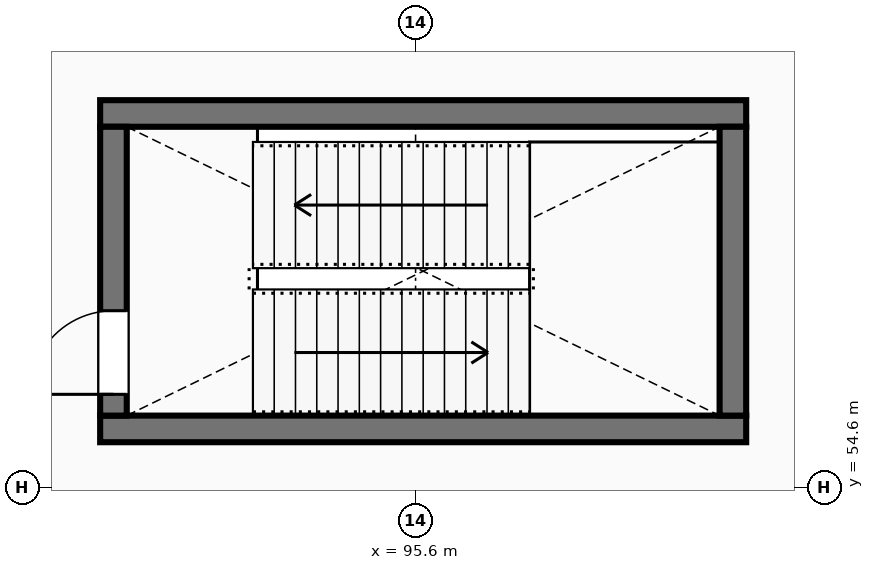
"""IFC4 building model, lengths in metres.
Left out: names, types, materials, properties, quantities, classifications, styles, units other than length and angle.
Written with IfcOpenShell. Run it as: python <this file> out.ifc"""

import sys

from ifc_helpers import new_model, si_unit, direction, frame, frame_2d, origin, place, context, subcontext, project, spatial, rectangle, extrude, element, fill, save


model = new_model("IFC4")
c1 = context("Model", 3, precision=1e-05, world=origin(), true_north=direction((0.0, 1.0)))
c2 = subcontext(c1, "Body", "Model", "MODEL_VIEW")
j1 = project(units=[si_unit("LENGTHUNIT", "METRE"), si_unit("PLANEANGLEUNIT", "RADIAN")], contexts=[c1])
p1 = place(None, origin())
s1 = spatial("IfcSite", under=j1, at=p1, CompositionType="ELEMENT")
p2 = place(p1, origin())
s2 = spatial("IfcBuilding", under=s1, at=p2, CompositionType="ELEMENT")
p3 = place(p2, frame((0.0, 0.0, 10.2)))
s3 = spatial("IfcBuildingStorey", under=s2, at=p3, CompositionType="ELEMENT", Elevation=10.2)
for number, where, z_axis, x_axis in (
    (1, (91.45, 55.375, 0.0), (0.0, 0.0, 1.0), (1.0, 0.0, 0.0)),
    (2, (99.95, 59.525, 0.0), (0.0, 0.0, 1.0), (-1.0, 0.0, 0.0)),
):
    element("IfcWall", number, at=place(p3, frame(where, z_axis=z_axis, x_axis=x_axis)), inside=s3, PredefinedType="SHEAR", context=c2, shape_type="SweptSolid", body=[
        extrude(rectangle(XDim=8.5, YDim=0.35, at=frame_2d((4.25, 0.0))), origin(), (0.0, 0.0, 1.0), 4.48),
    ])
p4 = place(p3, frame((91.625, 55.55, 0.0), z_axis=(0.0, 0.0, 1.0), x_axis=(0.0, 1.0, 0.0)))
e3 = element("IfcWall", 3, at=p4, inside=s3, PredefinedType="SHEAR", context=c2, shape_type="SweptSolid", body=[
    extrude(rectangle(XDim=3.8, YDim=0.35, at=frame_2d((1.9, 0.0))), origin(), (0.0, 0.0, 1.0), 4.48),
])
p5 = place(p4, frame((0.28, 0.0, 0.0)))
e4 = element("IfcOpeningElement", 4, at=p5, cuts=e3, PredefinedType="OPENING", context=c2, shape_type="SweptSolid", body=[
    extrude(rectangle(XDim=1.1, YDim=2.08, at=frame_2d((0.55, 1.04))), frame((0.0, 0.185, 0.0), z_axis=(0.0, -1.0, 0.0), x_axis=(1.0, 0.0, 0.0)), (0.0, 0.0, 1.0), 0.37),
])
p6 = place(p3, frame((99.775, 59.35, 0.0), z_axis=(0.0, 0.0, 1.0), x_axis=(0.0, -1.0, 0.0)))
e5 = element("IfcWall", 5, at=p6, inside=s3, PredefinedType="SHEAR", context=c2, shape_type="SweptSolid", body=[
    extrude(rectangle(XDim=3.8, YDim=0.35, at=frame_2d((1.9, 0.0))), origin(), (0.0, 0.0, 1.0), 4.48),
])
p7 = place(p5, origin())
e6 = element("IfcDoor", 6, at=p7, inside=s3, OperationType="SINGLE_SWING_LEFT", PredefinedType="DOOR", context=c2, shape_type="SweptSolid", body=[
    extrude(rectangle(XDim=1.1, YDim=2.08, at=frame_2d((0.55, 1.04))), frame((0.0, 0.025, 0.0), z_axis=(0.0, -1.0, 0.0), x_axis=(1.0, 0.0, 0.0)), (0.0, 0.0, 1.0), 0.05),
])
fill(e4, e6)
save(model, sys.argv[1])
